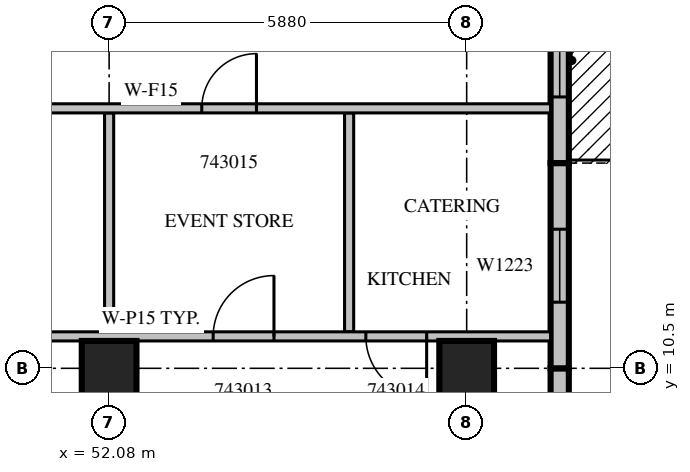
"""IFC4 building model, lengths in metres.
Left out: names, types, materials, properties, quantities, classifications, styles, units other than length and angle.
Written with IfcOpenShell. Run it as: python <this file> out.ifc"""

import sys

from ifc_helpers import new_model, si_unit, direction, frame, frame_2d, origin, origin_2d, place, context, subcontext, project, spatial, rectangle, extrude, source, transform, mapped, element, fill, save


model = new_model("IFC4")
c1 = context("Model", 3, precision=1e-05, world=origin(), true_north=direction((0.0, 1.0)))
c2 = subcontext(c1, "Body", "Model", "MODEL_VIEW")
j1 = project(units=[si_unit("LENGTHUNIT", "METRE"), si_unit("PLANEANGLEUNIT", "RADIAN")], contexts=[c1])
p1 = place(None, origin())
s1 = spatial("IfcSite", under=j1, at=p1, CompositionType="ELEMENT")
p2 = place(p1, origin())
s2 = spatial("IfcBuilding", under=s1, at=p2, CompositionType="ELEMENT")
p3 = place(p2, frame((0.0, 0.0, 196.8)))
s3 = spatial("IfcBuildingStorey", under=s2, at=p3, CompositionType="ELEMENT", Elevation=196.8)
m1 = source(origin(), c2, "Body", "SweptSolid", [
    extrude(rectangle(XDim=0.9, YDim=0.9, at=origin_2d()), origin(), (0.0, 0.0, 1.0), 3.8),
])
for number, where, z_axis, x_axis in (
    (1, (52.08, 10.5, 0.0), (0.0, 0.0, 1.0), (1.0, 0.0, 0.0)),
    (2, (57.96, 10.5, 0.0), (0.0, 0.0, 1.0), (1.0, 0.0, 0.0)),
):
    element("IfcColumn", number, at=place(p3, frame(where, z_axis=z_axis, x_axis=x_axis)), inside=s3, PredefinedType="COLUMN", context=c2, shape_type="MappedRepresentation", body=[
        mapped(m1, transform((0.0, 0.0, 0.0), scale=1.0)),
    ])
m2 = source(origin(), c2, "Body", "SweptSolid", [
    extrude(rectangle(XDim=6.3, YDim=0.3, at=frame_2d((3.15, 0.0))), origin(), (0.0, 0.0, 1.0), 3.4),
])
p4 = place(p3, frame((59.49, 4.2, 0.0), z_axis=(0.0, 0.0, 1.0), x_axis=(0.0, 1.0, 0.0)))
e3 = element("IfcWall", 3, at=p4, inside=s3, PredefinedType="STANDARD", context=c2, shape_type="MappedRepresentation", body=[
    mapped(m2, transform((0.0, 0.0, 0.0), scale=1.0)),
])
m3 = source(origin(), c2, "Body", "SweptSolid", [
    extrude(rectangle(XDim=1.8, YDim=2.3, at=frame_2d((0.9, 1.15))), frame((0.0, 0.16, 0.0), z_axis=(0.0, -1.0, 0.0), x_axis=(1.0, 0.0, 0.0)), (0.0, 0.0, 1.0), 0.32),
])
p5 = place(p4, frame((0.675, 0.0, 0.6)))
e4 = element("IfcOpeningElement", 4, at=p5, cuts=e3, PredefinedType="OPENING", context=c2, shape_type="MappedRepresentation", body=[
    mapped(m3, transform((0.0, 0.0, 0.0), scale=1.0)),
])
p6 = place(p4, frame((3.825, 0.0, 0.6)))
e5 = element("IfcOpeningElement", 5, at=p6, cuts=e3, PredefinedType="OPENING", context=c2, shape_type="MappedRepresentation", body=[
    mapped(m3, transform((0.0, 0.0, 0.0), scale=1.0)),
])
m4 = source(origin(), c2, "Body", "SweptSolid", [
    extrude(rectangle(XDim=3.375, YDim=0.3, at=frame_2d((1.688, 0.0))), origin(), (0.0, 0.0, 1.0), 3.4),
])
p7 = place(p3, frame((59.49, 10.5, 0.0), z_axis=(0.0, 0.0, 1.0), x_axis=(0.0, 1.0, 0.0)))
e6 = element("IfcWall", 6, at=p7, inside=s3, PredefinedType="STANDARD", context=c2, shape_type="MappedRepresentation", body=[
    mapped(m4, transform((0.0, 0.0, 0.0), scale=1.0)),
])
m5 = source(origin(), c2, "Body", "SweptSolid", [
    extrude(rectangle(XDim=1.2, YDim=2.3, at=frame_2d((0.6, 1.15))), frame((0.0, 0.16, 0.0), z_axis=(0.0, -1.0, 0.0), x_axis=(1.0, 0.0, 0.0)), (0.0, 0.0, 1.0), 0.32),
])
p8 = place(p7, frame((1.087, 0.0, 0.6)))
e7 = element("IfcOpeningElement", 7, at=p8, cuts=e6, PredefinedType="OPENING", context=c2, shape_type="MappedRepresentation", body=[
    mapped(m5, transform((0.0, 0.0, 0.0), scale=1.0)),
])
p9 = place(p3, frame((59.49, 13.875, 0.0), z_axis=(0.0, 0.0, 1.0), x_axis=(0.0, 1.0, 0.0)))
e8 = element("IfcWall", 8, at=p9, inside=s3, PredefinedType="STANDARD", context=c2, shape_type="MappedRepresentation", body=[
    mapped(m4, transform((0.0, 0.0, 0.0), scale=1.0)),
])
m6 = source(origin(), c2, "Body", "SweptSolid", [
    extrude(rectangle(XDim=1.8, YDim=2.4, at=frame_2d((0.9, 1.2))), frame((0.0, 0.16, 0.0), z_axis=(0.0, -1.0, 0.0), x_axis=(1.0, 0.0, 0.0)), (0.0, 0.0, 1.0), 0.32),
])
p10 = place(p9, frame((1.087, 0.0, 0.0)))
e9 = element("IfcOpeningElement", 9, at=p10, cuts=e8, PredefinedType="OPENING", context=c2, shape_type="MappedRepresentation", body=[
    mapped(m6, transform((0.0, 0.0, 0.0), scale=1.0)),
])
m7 = source(origin(), c2, "Body", "SweptSolid", [
    extrude(rectangle(XDim=3.6, YDim=0.15, at=frame_2d((1.8, 0.0))), origin(), (0.0, 0.0, 1.0), 3.4),
])
for number, where, z_axis, x_axis in (
    (10, (52.08, 11.1, 0.0), (0.0, 0.0, 1.0), (0.0, 1.0, 0.0)),
    (11, (56.027, 11.1, 0.0), (0.0, 0.0, 1.0), (0.0, 1.0, 0.0)),
):
    element("IfcWall", number, at=place(p3, frame(where, z_axis=z_axis, x_axis=x_axis)), inside=s3, PredefinedType="PARTITIONING", context=c2, shape_type="MappedRepresentation", body=[
        mapped(m7, transform((0.0, 0.0, 0.0), scale=1.0)),
    ])
m8 = source(origin(), c2, "Body", "SweptSolid", [
    extrude(rectangle(XDim=13.14, YDim=0.15, at=frame_2d((6.57, 0.0))), origin(), (0.0, 0.0, 1.0), 3.4),
])
p11 = place(p3, frame((59.34, 11.025, 0.0), z_axis=(0.0, 0.0, 1.0), x_axis=(-1.0, 0.0, 0.0)))
e12 = element("IfcWall", 12, at=p11, inside=s3, PredefinedType="PARTITIONING", context=c2, shape_type="MappedRepresentation", body=[
    mapped(m8, transform((0.0, 0.0, 0.0), scale=1.0)),
])
m9 = source(origin(), c2, "Body", "SweptSolid", [
    extrude(rectangle(XDim=1.6, YDim=2.1, at=frame_2d((0.8, 1.05))), frame((0.0, 0.085, 0.0), z_axis=(0.0, -1.0, 0.0), x_axis=(1.0, 0.0, 0.0)), (0.0, 0.0, 1.0), 0.17),
])
p12 = place(p11, frame((9.402, 0.0, 0.0)))
e13 = element("IfcOpeningElement", 13, at=p12, cuts=e12, PredefinedType="OPENING", context=c2, shape_type="MappedRepresentation", body=[
    mapped(m9, transform((0.0, 0.0, 0.0), scale=1.0)),
])
m10 = source(origin(), c2, "Body", "SweptSolid", [
    extrude(rectangle(XDim=1.0, YDim=2.1, at=frame_2d((0.5, 1.05))), frame((0.0, 0.085, 0.0), z_axis=(0.0, -1.0, 0.0), x_axis=(1.0, 0.0, 0.0)), (0.0, 0.0, 1.0), 0.17),
])
p13 = place(p11, frame((4.549, 0.0, 0.0)))
e14 = element("IfcOpeningElement", 14, at=p13, cuts=e12, PredefinedType="OPENING", context=c2, shape_type="MappedRepresentation", body=[
    mapped(m10, transform((0.0, 0.0, 0.0), scale=1.0)),
])
p14 = place(p11, frame((2.038, 0.0, 0.0)))
e15 = element("IfcOpeningElement", 15, at=p14, cuts=e12, PredefinedType="OPENING", context=c2, shape_type="MappedRepresentation", body=[
    mapped(m10, transform((0.0, 0.0, 0.0), scale=1.0)),
])
p15 = place(p3, frame((59.34, 14.775, 0.0), z_axis=(0.0, 0.0, 1.0), x_axis=(-1.0, 0.0, 0.0)))
e16 = element("IfcWall", 16, at=p15, inside=s3, PredefinedType="PARTITIONING", context=c2, shape_type="MappedRepresentation", body=[
    mapped(m8, transform((0.0, 0.0, 0.0), scale=1.0)),
])
p16 = place(p15, frame((9.4, 0.0, 0.0)))
e17 = element("IfcOpeningElement", 17, at=p16, cuts=e16, PredefinedType="OPENING", context=c2, shape_type="MappedRepresentation", body=[
    mapped(m9, transform((0.0, 0.0, 0.0), scale=1.0)),
])
m11 = source(origin(), c2, "Body", "SweptSolid", [
    extrude(rectangle(XDim=0.9, YDim=2.1, at=frame_2d((0.45, 1.05))), frame((0.0, 0.085, 0.0), z_axis=(0.0, -1.0, 0.0), x_axis=(1.0, 0.0, 0.0)), (0.0, 0.0, 1.0), 0.17),
])
p17 = place(p15, frame((4.837, 0.0, 0.0)))
e18 = element("IfcOpeningElement", 18, at=p17, cuts=e16, PredefinedType="OPENING", context=c2, shape_type="MappedRepresentation", body=[
    mapped(m11, transform((0.0, 0.0, 0.0), scale=1.0)),
])
m12 = source(origin(), c2, "Body", "SweptSolid", [
    extrude(rectangle(XDim=1.2, YDim=2.3, at=frame_2d((0.6, 1.15))), frame((0.0, 0.03, 0.0), z_axis=(0.0, -1.0, 0.0), x_axis=(1.0, 0.0, 0.0)), (0.0, 0.0, 1.0), 0.06),
])
p18 = place(p8, origin())
e19 = element("IfcWindow", 19, at=p18, inside=s3, PartitioningType="SINGLE_PANEL", PredefinedType="WINDOW", context=c2, shape_type="MappedRepresentation", body=[
    mapped(m12, transform((0.0, 0.0, 0.0), scale=1.0)),
])
fill(e7, e19)
m13 = source(origin(), c2, "Body", "SweptSolid", [
    extrude(rectangle(XDim=1.8, YDim=2.4, at=frame_2d((0.9, 1.2))), frame((0.0, 0.025, 0.0), z_axis=(0.0, -1.0, 0.0), x_axis=(1.0, 0.0, 0.0)), (0.0, 0.0, 1.0), 0.05),
])
p19 = place(p10, origin())
e20 = element("IfcDoor", 20, at=p19, inside=s3, OperationType="SLIDING_TO_LEFT", PredefinedType="DOOR", context=c2, shape_type="MappedRepresentation", body=[
    mapped(m13, transform((0.0, 0.0, 0.0), scale=1.0)),
])
fill(e9, e20)
m14 = source(origin(), c2, "Body", "SweptSolid", [
    extrude(rectangle(XDim=1.0, YDim=2.1, at=frame_2d((0.5, 1.05))), frame((0.0, 0.025, 0.0), z_axis=(0.0, -1.0, 0.0), x_axis=(1.0, 0.0, 0.0)), (0.0, 0.0, 1.0), 0.05),
])
p20 = place(p13, origin())
e21 = element("IfcDoor", 21, at=p20, inside=s3, OperationType="SINGLE_SWING_RIGHT", PredefinedType="DOOR", context=c2, shape_type="MappedRepresentation", body=[
    mapped(m14, transform((0.0, 0.0, 0.0), scale=1.0)),
])
fill(e14, e21)
p21 = place(p14, origin())
e22 = element("IfcDoor", 22, at=p21, inside=s3, OperationType="SINGLE_SWING_LEFT", PredefinedType="DOOR", context=c2, shape_type="MappedRepresentation", body=[
    mapped(m14, transform((0.0, 0.0, 0.0), scale=1.0)),
])
fill(e15, e22)
m15 = source(origin(), c2, "Body", "SweptSolid", [
    extrude(rectangle(XDim=0.9, YDim=2.1, at=frame_2d((0.45, 1.05))), frame((0.0, 0.025, 0.0), z_axis=(0.0, -1.0, 0.0), x_axis=(1.0, 0.0, 0.0)), (0.0, 0.0, 1.0), 0.05),
])
p22 = place(p17, origin())
e23 = element("IfcDoor", 23, at=p22, inside=s3, OperationType="SINGLE_SWING_RIGHT", PredefinedType="DOOR", context=c2, shape_type="MappedRepresentation", body=[
    mapped(m15, transform((0.0, 0.0, 0.0), scale=1.0)),
])
fill(e18, e23)
save(model, sys.argv[1])
